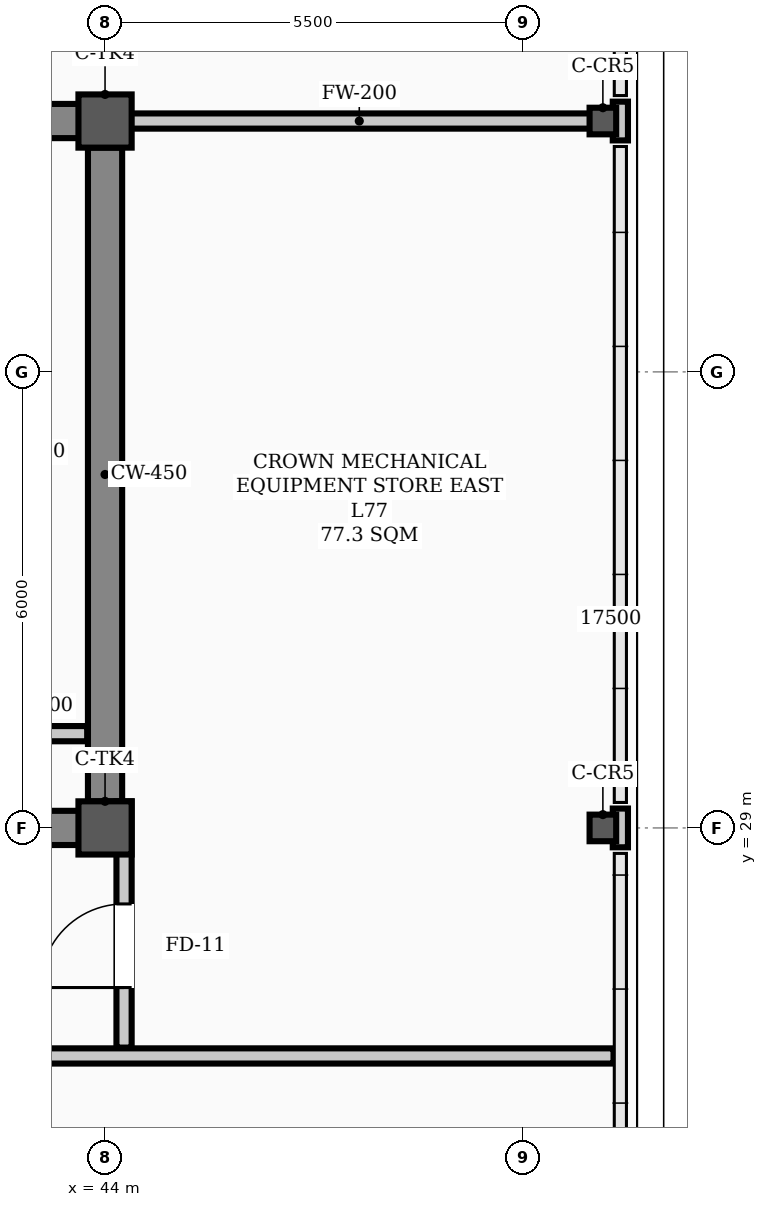
"""IFC4 building model, lengths in metres.
Left out: names, types, materials, properties, quantities, classifications, styles, units other than length and angle.
Written with IfcOpenShell. Run it as: python <this file> out.ifc"""

import sys

from ifc_helpers import new_model, si_unit, direction, frame, frame_2d, origin, origin_2d, place, context, subcontext, project, spatial, rectangle, hollow_rectangle, extrude, element, fill, save


model = new_model("IFC4")
c1 = context("Model", 3, precision=1e-05, world=origin(), true_north=direction((0.0, 1.0)))
c2 = subcontext(c1, "Body", "Model", "MODEL_VIEW")
j1 = project(units=[si_unit("LENGTHUNIT", "METRE"), si_unit("PLANEANGLEUNIT", "RADIAN")], contexts=[c1])
p1 = place(None, origin())
s1 = spatial("IfcSite", under=j1, at=p1, CompositionType="ELEMENT")
p2 = place(p1, origin())
s2 = spatial("IfcBuilding", under=s1, at=p2, CompositionType="ELEMENT")
p3 = place(p2, frame((0.0, 0.0, 312.6)))
s3 = spatial("IfcBuildingStorey", under=s2, at=p3, CompositionType="ELEMENT", Elevation=312.6)
for number, where, z_axis, x_axis in (
    (1, (44.0, 29.0, 0.0), (0.0, 0.0, 1.0), (1.0, 0.0, 0.0)),
    (2, (44.0, 38.3, 0.0), (0.0, 0.0, 1.0), (1.0, 0.0, 0.0)),
):
    element("IfcColumn", number, at=place(p3, frame(where, z_axis=z_axis, x_axis=x_axis)), inside=s3, PredefinedType="COLUMN", context=c2, shape_type="SweptSolid", body=[
        extrude(hollow_rectangle(XDim=0.7, YDim=0.7, WallThickness=0.028, InnerFilletRadius=0.014, OuterFilletRadius=0.042, at=origin_2d()), origin(), (0.0, 0.0, 1.0), 4.8),
    ])
for number, where, z_axis, x_axis in (
    (3, (50.55, 29.0, 0.0), (0.0, 0.0, 1.0), (1.0, 0.0, 0.0)),
    (4, (50.55, 38.3, 0.0), (0.0, 0.0, 1.0), (1.0, 0.0, 0.0)),
):
    element("IfcColumn", number, at=place(p3, frame(where, z_axis=z_axis, x_axis=x_axis)), inside=s3, PredefinedType="COLUMN", context=c2, shape_type="SweptSolid", body=[
        extrude(hollow_rectangle(XDim=0.35, YDim=0.35, WallThickness=0.016, InnerFilletRadius=0.016, OuterFilletRadius=0.032, at=origin_2d()), origin(), (0.0, 0.0, 1.0), 4.8),
    ])
p4 = place(p3, frame((50.78, 28.745, 0.0), z_axis=(0.0, 0.0, 1.0), x_axis=(0.0, 1.0, 0.0)))
e5 = element("IfcWall", 5, at=p4, inside=s3, PredefinedType="PARAPET", context=c2, shape_type="SweptSolid", body=[
    extrude(rectangle(XDim=0.51, YDim=0.2, at=frame_2d((0.255, 0.0))), origin(), (0.0, 0.0, 1.0), 1.2),
])
p5 = place(p3, frame((50.78, 38.045, 0.0), z_axis=(0.0, 0.0, 1.0), x_axis=(0.0, 1.0, 0.0)))
e6 = element("IfcWall", 6, at=p5, inside=s3, PredefinedType="PARAPET", context=c2, shape_type="SweptSolid", body=[
    extrude(rectangle(XDim=0.51, YDim=0.2, at=frame_2d((0.255, 0.0))), origin(), (0.0, 0.0, 1.0), 1.2),
])
p6 = place(p3, frame((13.5, 29.0, 0.0), z_axis=(0.0, 0.0, 1.0), x_axis=(1.0, 0.0, 0.0)))
e7 = element("IfcWall", 7, at=p6, inside=s3, PredefinedType="SHEAR", context=c2, shape_type="SweptSolid", body=[
    extrude(rectangle(XDim=30.5, YDim=0.45, at=frame_2d((15.25, 0.0))), origin(), (0.0, 0.0, 1.0), 4.45),
])
p7 = place(p6, frame((1.75, 0.0, 0.0)))
e8 = element("IfcOpeningElement", 8, at=p7, cuts=e7, PredefinedType="OPENING", context=c2, shape_type="SweptSolid", body=[
    extrude(rectangle(XDim=1.1, YDim=2.08, at=frame_2d((0.55, 1.04))), frame((0.0, 0.235, 0.0), z_axis=(0.0, -1.0, 0.0), x_axis=(1.0, 0.0, 0.0)), (0.0, 0.0, 1.0), 0.47),
])
p8 = place(p6, frame((26.7, 0.0, 0.0)))
e9 = element("IfcOpeningElement", 9, at=p8, cuts=e7, PredefinedType="OPENING", context=c2, shape_type="SweptSolid", body=[
    extrude(rectangle(XDim=1.1, YDim=2.08, at=frame_2d((0.55, 1.04))), frame((0.0, 0.235, 0.0), z_axis=(0.0, -1.0, 0.0), x_axis=(1.0, 0.0, 0.0)), (0.0, 0.0, 1.0), 0.47),
])
p9 = place(p6, frame((6.8, 0.0, 0.0)))
e10 = element("IfcOpeningElement", 10, at=p9, cuts=e7, PredefinedType="OPENING", context=c2, shape_type="SweptSolid", body=[
    extrude(rectangle(XDim=1.1, YDim=2.08, at=frame_2d((0.55, 1.04))), frame((0.0, 0.235, 0.0), z_axis=(0.0, -1.0, 0.0), x_axis=(1.0, 0.0, 0.0)), (0.0, 0.0, 1.0), 0.47),
])
p10 = place(p6, frame((13.2, 0.0, 0.0)))
e11 = element("IfcOpeningElement", 11, at=p10, cuts=e7, PredefinedType="OPENING", context=c2, shape_type="SweptSolid", body=[
    extrude(rectangle(XDim=1.6, YDim=2.08, at=frame_2d((0.8, 1.04))), frame((0.0, 0.235, 0.0), z_axis=(0.0, -1.0, 0.0), x_axis=(1.0, 0.0, 0.0)), (0.0, 0.0, 1.0), 0.47),
])
p11 = place(p6, frame((19.5, 0.0, 0.0)))
e12 = element("IfcOpeningElement", 12, at=p11, cuts=e7, PredefinedType="OPENING", context=c2, shape_type="SweptSolid", body=[
    extrude(rectangle(XDim=0.9, YDim=2.08, at=frame_2d((0.45, 1.04))), frame((0.0, 0.235, 0.0), z_axis=(0.0, -1.0, 0.0), x_axis=(1.0, 0.0, 0.0)), (0.0, 0.0, 1.0), 0.47),
])
p12 = place(p6, frame((21.55, 0.0, 0.0)))
e13 = element("IfcOpeningElement", 13, at=p12, cuts=e7, PredefinedType="OPENING", context=c2, shape_type="SweptSolid", body=[
    extrude(rectangle(XDim=0.9, YDim=2.08, at=frame_2d((0.45, 1.04))), frame((0.0, 0.235, 0.0), z_axis=(0.0, -1.0, 0.0), x_axis=(1.0, 0.0, 0.0)), (0.0, 0.0, 1.0), 0.47),
])
p13 = place(p3, frame((13.5, 38.3, 0.0), z_axis=(0.0, 0.0, 1.0), x_axis=(1.0, 0.0, 0.0)))
e14 = element("IfcWall", 14, at=p13, inside=s3, PredefinedType="SHEAR", context=c2, shape_type="SweptSolid", body=[
    extrude(rectangle(XDim=30.5, YDim=0.45, at=frame_2d((15.25, 0.0))), origin(), (0.0, 0.0, 1.0), 4.45),
])
p14 = place(p3, frame((44.0, 29.35, 0.0), z_axis=(0.0, 0.0, 1.0), x_axis=(0.0, 1.0, 0.0)))
e15 = element("IfcWall", 15, at=p14, inside=s3, PredefinedType="SHEAR", context=c2, shape_type="SweptSolid", body=[
    extrude(rectangle(XDim=8.6, YDim=0.45, at=frame_2d((4.3, 0.0))), origin(), (0.0, 0.0, 1.0), 4.45),
])
p15 = place(p3, frame((42.4, 30.24, 0.0), z_axis=(0.0, 0.0, 1.0), x_axis=(1.0, 0.0, 0.0)))
e16 = element("IfcWall", 16, at=p15, inside=s3, PredefinedType="STANDARD", context=c2, shape_type="SweptSolid", body=[
    extrude(rectangle(XDim=1.365, YDim=0.2, at=frame_2d((0.683, 0.0))), origin(), (0.0, 0.0, 1.0), 4.45),
])
p16 = place(p3, frame((12.31, 26.0, 0.0), z_axis=(0.0, 0.0, 1.0), x_axis=(1.0, 0.0, 0.0)))
e17 = element("IfcWall", 17, at=p16, inside=s3, PredefinedType="STANDARD", context=c2, shape_type="SweptSolid", body=[
    extrude(rectangle(XDim=38.38, YDim=0.2, at=frame_2d((19.19, 0.0))), origin(), (0.0, 0.0, 1.0), 4.396),
])
p17 = place(p16, frame((6.34, 0.0, 0.0)))
e18 = element("IfcOpeningElement", 18, at=p17, cuts=e17, PredefinedType="OPENING", context=c2, shape_type="SweptSolid", body=[
    extrude(rectangle(XDim=1.1, YDim=2.08, at=frame_2d((0.55, 1.04))), frame((0.0, 0.11, 0.0), z_axis=(0.0, -1.0, 0.0), x_axis=(1.0, 0.0, 0.0)), (0.0, 0.0, 1.0), 0.22),
])
p18 = place(p16, frame((14.39, 0.0, 0.0)))
e19 = element("IfcOpeningElement", 19, at=p18, cuts=e17, PredefinedType="OPENING", context=c2, shape_type="SweptSolid", body=[
    extrude(rectangle(XDim=1.6, YDim=2.08, at=frame_2d((0.8, 1.04))), frame((0.0, 0.11, 0.0), z_axis=(0.0, -1.0, 0.0), x_axis=(1.0, 0.0, 0.0)), (0.0, 0.0, 1.0), 0.22),
])
p19 = place(p16, frame((21.39, 0.0, 0.0)))
e20 = element("IfcOpeningElement", 20, at=p19, cuts=e17, PredefinedType="OPENING", context=c2, shape_type="SweptSolid", body=[
    extrude(rectangle(XDim=1.1, YDim=2.08, at=frame_2d((0.55, 1.04))), frame((0.0, 0.11, 0.0), z_axis=(0.0, -1.0, 0.0), x_axis=(1.0, 0.0, 0.0)), (0.0, 0.0, 1.0), 0.22),
])
p20 = place(p16, frame((27.89, 0.0, 0.0)))
e21 = element("IfcOpeningElement", 21, at=p20, cuts=e17, PredefinedType="OPENING", context=c2, shape_type="SweptSolid", body=[
    extrude(rectangle(XDim=1.1, YDim=2.08, at=frame_2d((0.55, 1.04))), frame((0.0, 0.11, 0.0), z_axis=(0.0, -1.0, 0.0), x_axis=(1.0, 0.0, 0.0)), (0.0, 0.0, 1.0), 0.22),
])
p21 = place(p3, frame((44.0, 38.3, 0.0), z_axis=(0.0, 0.0, 1.0), x_axis=(1.0, 0.0, 0.0)))
e22 = element("IfcWall", 22, at=p21, inside=s3, PredefinedType="STANDARD", context=c2, shape_type="SweptSolid", body=[
    extrude(rectangle(XDim=6.69, YDim=0.2, at=frame_2d((3.345, 0.0))), origin(), (0.0, 0.0, 1.0), 4.45),
])
p22 = place(p3, frame((44.25, 26.11, 0.0), z_axis=(0.0, 0.0, 1.0), x_axis=(0.0, 1.0, 0.0)))
e23 = element("IfcWall", 23, at=p22, inside=s3, PredefinedType="STANDARD", context=c2, shape_type="SweptSolid", body=[
    extrude(rectangle(XDim=3.24, YDim=0.2, at=frame_2d((1.62, 0.0))), origin(), (0.0, 0.0, 1.0), 4.396),
])
p23 = place(p22, frame((0.79, 0.0, 0.0)))
e24 = element("IfcOpeningElement", 24, at=p23, cuts=e23, PredefinedType="OPENING", context=c2, shape_type="SweptSolid", body=[
    extrude(rectangle(XDim=1.1, YDim=2.08, at=frame_2d((0.55, 1.04))), frame((0.0, 0.11, 0.0), z_axis=(0.0, -1.0, 0.0), x_axis=(1.0, 0.0, 0.0)), (0.0, 0.0, 1.0), 0.22),
])
p24 = place(p23, origin())
e25 = element("IfcDoor", 25, at=p24, inside=s3, OperationType="SINGLE_SWING_LEFT", PredefinedType="DOOR", context=c2, shape_type="SweptSolid", body=[
    extrude(rectangle(XDim=1.1, YDim=2.08, at=frame_2d((0.55, 1.04))), frame((0.0, 0.025, 0.0), z_axis=(0.0, -1.0, 0.0), x_axis=(1.0, 0.0, 0.0)), (0.0, 0.0, 1.0), 0.05),
])
fill(e24, e25)
save(model, sys.argv[1])
